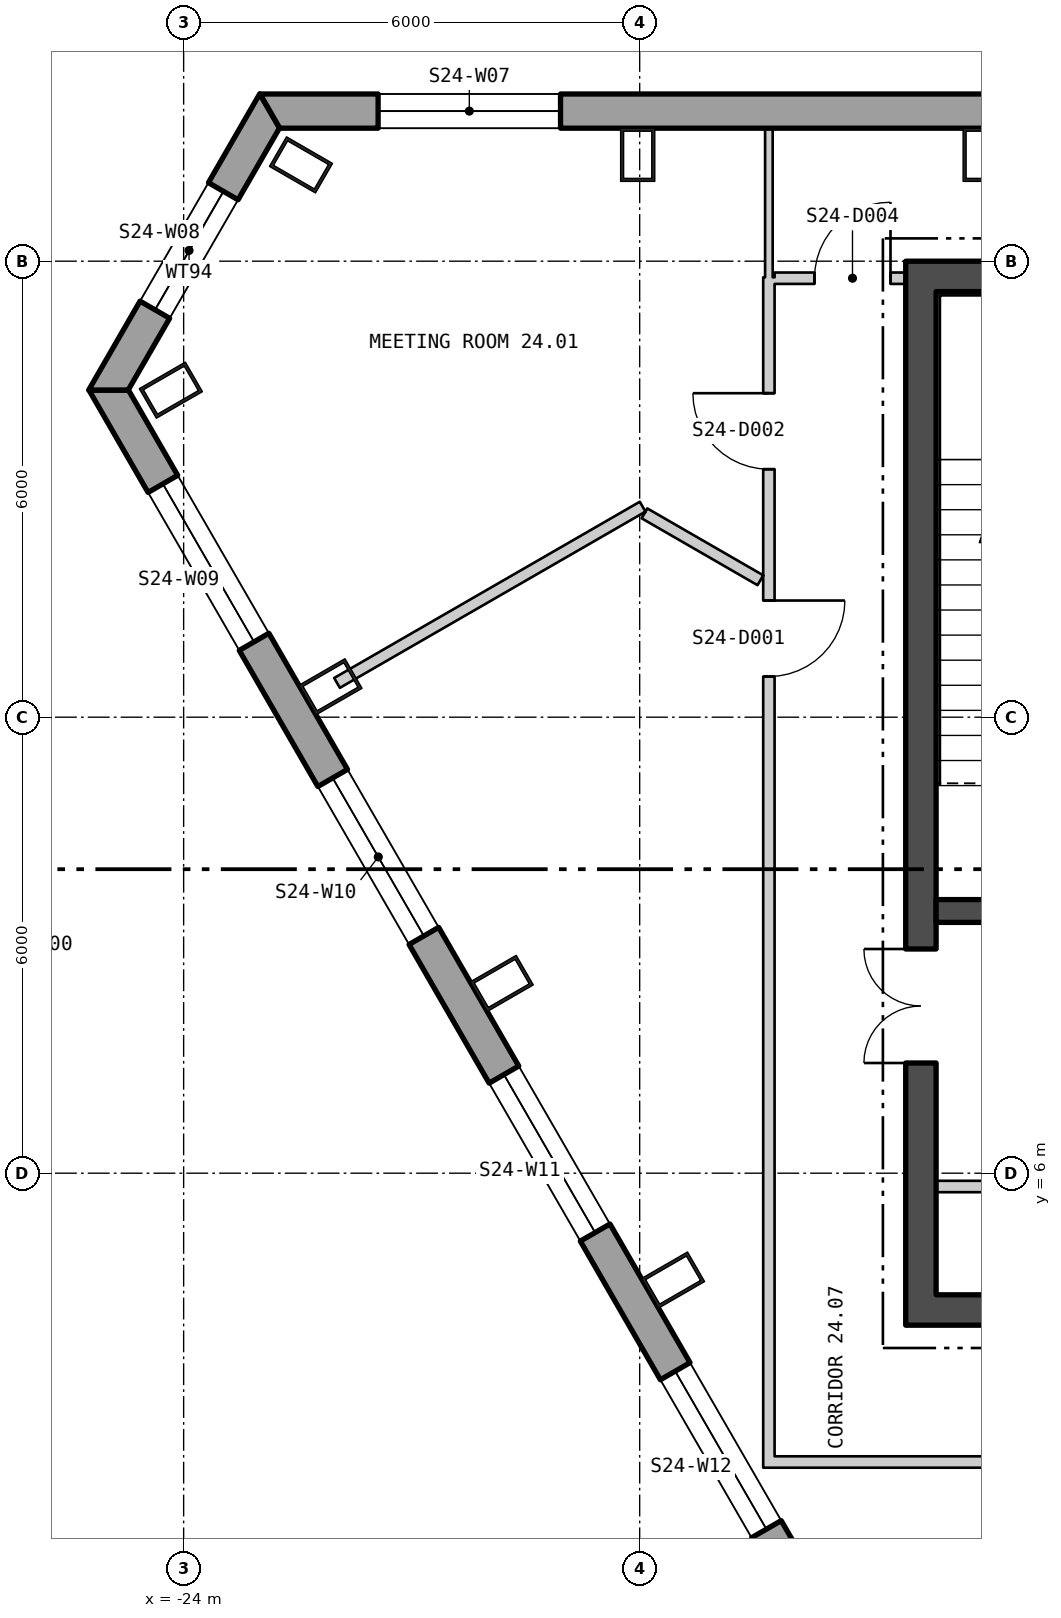
"""IFC4 building model, lengths in metres.
Left out: names, types, materials, properties, quantities, classifications, styles, units other than length and angle.
Written with IfcOpenShell. Run it as: python <this file> out.ifc"""

import sys

from ifc_helpers import new_model, si_unit, direction, frame, frame_2d, origin, origin_2d, place, context, subcontext, project, spatial, polyline, rectangle, hollow_rectangle, outline, extrude, element, fill, save


model = new_model("IFC4")
c1 = context("Model", 3, precision=1e-05, world=origin(), true_north=direction((0.0, 1.0)))
c2 = subcontext(c1, "Body", "Model", "MODEL_VIEW")
j1 = project(units=[si_unit("LENGTHUNIT", "METRE"), si_unit("PLANEANGLEUNIT", "RADIAN")], contexts=[c1])
p1 = place(None, origin())
s1 = spatial("IfcSite", under=j1, at=p1, CompositionType="ELEMENT")
p2 = place(p1, origin())
s2 = spatial("IfcBuilding", under=s1, at=p2, CompositionType="ELEMENT")
p3 = place(p2, frame((0.0, 0.0, 312.6)))
s3 = spatial("IfcBuildingStorey", under=s2, at=p3, CompositionType="ELEMENT", Elevation=312.6)
for number, where, z_axis, x_axis in (
    (1, (-13.52, 19.4, 0.0), (0.0, 0.0, 1.0), (-1.0, 0.0, 0.0)),
    (2, (-18.026, 19.4, 0.0), (0.0, 0.0, 1.0), (-1.0, 0.0, 0.0)),
    (3, (-22.456, 19.267, 0.0), (0.0, 0.0, 1.0), (-0.5, -0.866, 0.0)),
    (4, (-24.168, 16.303, 0.0), (0.0, 0.0, 1.0), (0.5, -0.866, 0.0)),
    (5, (-22.068, 12.4, 0.0), (0.0, 0.0, 1.0), (0.5, -0.866, 0.0)),
    (6, (-19.815, 8.497, 0.0), (0.0, 0.0, 1.0), (0.5, -0.866, 0.0)),
    (7, (-17.561, 4.594, 0.0), (0.0, 0.0, 1.0), (0.5, -0.866, 0.0)),
):
    element("IfcColumn", number, at=place(p3, frame(where, z_axis=z_axis, x_axis=x_axis)), inside=s3, PredefinedType="COLUMN", context=c2, shape_type="SweptSolid", body=[
        extrude(hollow_rectangle(XDim=0.45, YDim=0.7, WallThickness=0.04, at=origin_2d()), origin(), (0.0, 0.0, 1.0), 4.2),
    ])
p4 = place(p3, frame((22.865, 19.975, -0.4), z_axis=(0.0, 0.0, 1.0), x_axis=(-1.0, 0.0, 0.0)))
e8 = element("IfcWall", 8, at=p4, inside=s3, PredefinedType="SOLIDWALL", context=c2, shape_type="SweptSolid", body=[
    extrude(outline(polyline([(-0.13, -0.225), (45.86, -0.225), (45.6, 0.225), (0.13, 0.225), (-0.13, -0.225)])), origin(), (0.0, 0.0, 1.0), 4.2),
])
p5 = place(p4, frame((1.424, 0.0, 1.3)))
e9 = element("IfcOpeningElement", 9, at=p5, cuts=e8, PredefinedType="OPENING", context=c2, shape_type="SweptSolid", body=[
    extrude(rectangle(XDim=2.4, YDim=2.3, at=frame_2d((1.2, 1.15))), frame((0.0, 0.235, 0.0), z_axis=(0.0, -1.0, 0.0), x_axis=(1.0, 0.0, 0.0)), (0.0, 0.0, 1.0), 0.47),
])
p6 = place(p4, frame((14.905, 0.0, 1.3)))
e10 = element("IfcOpeningElement", 10, at=p6, cuts=e8, PredefinedType="OPENING", context=c2, shape_type="SweptSolid", body=[
    extrude(rectangle(XDim=2.4, YDim=2.3, at=frame_2d((1.2, 1.15))), frame((0.0, 0.235, 0.0), z_axis=(0.0, -1.0, 0.0), x_axis=(1.0, 0.0, 0.0)), (0.0, 0.0, 1.0), 0.47),
])
p7 = place(p4, frame((19.412, 0.0, 1.3)))
e11 = element("IfcOpeningElement", 11, at=p7, cuts=e8, PredefinedType="OPENING", context=c2, shape_type="SweptSolid", body=[
    extrude(rectangle(XDim=2.4, YDim=2.3, at=frame_2d((1.2, 1.15))), frame((0.0, 0.235, 0.0), z_axis=(0.0, -1.0, 0.0), x_axis=(1.0, 0.0, 0.0)), (0.0, 0.0, 1.0), 0.47),
])
p8 = place(p4, frame((23.918, 0.0, 1.3)))
e12 = element("IfcOpeningElement", 12, at=p8, cuts=e8, PredefinedType="OPENING", context=c2, shape_type="SweptSolid", body=[
    extrude(rectangle(XDim=2.4, YDim=2.3, at=frame_2d((1.2, 1.15))), frame((0.0, 0.235, 0.0), z_axis=(0.0, -1.0, 0.0), x_axis=(1.0, 0.0, 0.0)), (0.0, 0.0, 1.0), 0.47),
])
p9 = place(p4, frame((28.425, 0.0, 1.3)))
e13 = element("IfcOpeningElement", 13, at=p9, cuts=e8, PredefinedType="OPENING", context=c2, shape_type="SweptSolid", body=[
    extrude(rectangle(XDim=2.4, YDim=2.3, at=frame_2d((1.2, 1.15))), frame((0.0, 0.235, 0.0), z_axis=(0.0, -1.0, 0.0), x_axis=(1.0, 0.0, 0.0)), (0.0, 0.0, 1.0), 0.47),
])
p10 = place(p4, frame((32.932, 0.0, 1.3)))
e14 = element("IfcOpeningElement", 14, at=p10, cuts=e8, PredefinedType="OPENING", context=c2, shape_type="SweptSolid", body=[
    extrude(rectangle(XDim=2.4, YDim=2.3, at=frame_2d((1.2, 1.15))), frame((0.0, 0.235, 0.0), z_axis=(0.0, -1.0, 0.0), x_axis=(1.0, 0.0, 0.0)), (0.0, 0.0, 1.0), 0.47),
])
p11 = place(p4, frame((41.907, 0.0, 1.3)))
e15 = element("IfcOpeningElement", 15, at=p11, cuts=e8, PredefinedType="OPENING", context=c2, shape_type="SweptSolid", body=[
    extrude(rectangle(XDim=2.4, YDim=2.3, at=frame_2d((1.2, 1.15))), frame((0.0, 0.235, 0.0), z_axis=(0.0, -1.0, 0.0), x_axis=(1.0, 0.0, 0.0)), (0.0, 0.0, 1.0), 0.47),
])
p12 = place(p3, frame((-22.869, 19.977, -0.4), z_axis=(0.0, 0.0, 1.0), x_axis=(-0.500002136082, -0.866024170514, 0.0)))
e16 = element("IfcWall", 16, at=p12, inside=s3, PredefinedType="SOLIDWALL", context=c2, shape_type="SweptSolid", body=[
    extrude(outline(polyline([(-0.13, -0.225), (4.37, -0.225), (4.11, 0.225), (0.13, 0.225), (-0.13, -0.225)])), origin(), (0.0, 0.0, 1.0), 4.2),
])
p13 = place(p12, frame((1.22, 0.0, 1.3)))
e17 = element("IfcOpeningElement", 17, at=p13, cuts=e16, PredefinedType="OPENING", context=c2, shape_type="SweptSolid", body=[
    extrude(rectangle(XDim=1.8, YDim=2.3, at=frame_2d((0.9, 1.15))), frame((0.0, 0.235, 0.0), z_axis=(0.0, -1.0, 0.0), x_axis=(1.0, 0.0, 0.0)), (0.0, 0.0, 1.0), 0.47),
])
p14 = place(p3, frame((-24.985, 16.303, -0.18), z_axis=(0.0, 0.0, 1.0), x_axis=(0.500000141277, -0.866025322218, 0.0)))
e18 = element("IfcWall", 18, at=p14, inside=s3, PredefinedType="SOLIDWALL", context=c2, shape_type="SweptSolid", body=[
    extrude(outline(polyline([(-0.13, -0.225), (45.86, -0.225), (45.6, 0.225), (0.13, 0.225), (-0.13, -0.225)])), origin(), (0.0, 0.0, 1.0), 3.98),
])
p15 = place(p14, frame((1.424, 0.0, 1.08)))
e19 = element("IfcOpeningElement", 19, at=p15, cuts=e18, PredefinedType="OPENING", context=c2, shape_type="SweptSolid", body=[
    extrude(rectangle(XDim=2.4, YDim=2.3, at=frame_2d((1.2, 1.15))), frame((0.0, 0.235, 0.0), z_axis=(0.0, -1.0, 0.0), x_axis=(1.0, 0.0, 0.0)), (0.0, 0.0, 1.0), 0.47),
])
p16 = place(p14, frame((5.892, 0.0, 1.08)))
e20 = element("IfcOpeningElement", 20, at=p16, cuts=e18, PredefinedType="OPENING", context=c2, shape_type="SweptSolid", body=[
    extrude(rectangle(XDim=2.4, YDim=2.3, at=frame_2d((1.2, 1.15))), frame((0.0, 0.235, 0.0), z_axis=(0.0, -1.0, 0.0), x_axis=(1.0, 0.0, 0.0)), (0.0, 0.0, 1.0), 0.47),
])
p17 = place(p14, frame((10.399, 0.0, 1.08)))
e21 = element("IfcOpeningElement", 21, at=p17, cuts=e18, PredefinedType="OPENING", context=c2, shape_type="SweptSolid", body=[
    extrude(rectangle(XDim=2.4, YDim=2.3, at=frame_2d((1.2, 1.15))), frame((0.0, 0.235, 0.0), z_axis=(0.0, -1.0, 0.0), x_axis=(1.0, 0.0, 0.0)), (0.0, 0.0, 1.0), 0.47),
])
p18 = place(p14, frame((14.905, 0.0, 1.08)))
e22 = element("IfcOpeningElement", 22, at=p18, cuts=e18, PredefinedType="OPENING", context=c2, shape_type="SweptSolid", body=[
    extrude(rectangle(XDim=2.4, YDim=2.3, at=frame_2d((1.2, 1.15))), frame((0.0, 0.235, 0.0), z_axis=(0.0, -1.0, 0.0), x_axis=(1.0, 0.0, 0.0)), (0.0, 0.0, 1.0), 0.47),
])
p19 = place(p14, frame((19.412, 0.0, 1.08)))
e23 = element("IfcOpeningElement", 23, at=p19, cuts=e18, PredefinedType="OPENING", context=c2, shape_type="SweptSolid", body=[
    extrude(rectangle(XDim=2.4, YDim=2.3, at=frame_2d((1.2, 1.15))), frame((0.0, 0.235, 0.0), z_axis=(0.0, -1.0, 0.0), x_axis=(1.0, 0.0, 0.0)), (0.0, 0.0, 1.0), 0.47),
])
p20 = place(p14, frame((23.918, 0.0, 1.08)))
e24 = element("IfcOpeningElement", 24, at=p20, cuts=e18, PredefinedType="OPENING", context=c2, shape_type="SweptSolid", body=[
    extrude(rectangle(XDim=2.4, YDim=2.3, at=frame_2d((1.2, 1.15))), frame((0.0, 0.235, 0.0), z_axis=(0.0, -1.0, 0.0), x_axis=(1.0, 0.0, 0.0)), (0.0, 0.0, 1.0), 0.47),
])
p21 = place(p14, frame((28.425, 0.0, 1.08)))
e25 = element("IfcOpeningElement", 25, at=p21, cuts=e18, PredefinedType="OPENING", context=c2, shape_type="SweptSolid", body=[
    extrude(rectangle(XDim=2.4, YDim=2.3, at=frame_2d((1.2, 1.15))), frame((0.0, 0.235, 0.0), z_axis=(0.0, -1.0, 0.0), x_axis=(1.0, 0.0, 0.0)), (0.0, 0.0, 1.0), 0.47),
])
p22 = place(p14, frame((37.438, 0.0, 1.08)))
e26 = element("IfcOpeningElement", 26, at=p22, cuts=e18, PredefinedType="OPENING", context=c2, shape_type="SweptSolid", body=[
    extrude(rectangle(XDim=2.4, YDim=2.3, at=frame_2d((1.2, 1.15))), frame((0.0, 0.235, 0.0), z_axis=(0.0, -1.0, 0.0), x_axis=(1.0, 0.0, 0.0)), (0.0, 0.0, 1.0), 0.47),
])
p23 = place(p14, frame((41.907, 0.0, 1.08)))
e27 = element("IfcOpeningElement", 27, at=p23, cuts=e18, PredefinedType="OPENING", context=c2, shape_type="SweptSolid", body=[
    extrude(rectangle(XDim=2.4, YDim=2.3, at=frame_2d((1.2, 1.15))), frame((0.0, 0.235, 0.0), z_axis=(0.0, -1.0, 0.0), x_axis=(1.0, 0.0, 0.0)), (0.0, 0.0, 1.0), 0.47),
])
p24 = place(p3, frame((-14.5, 4.2, 0.0), z_axis=(0.0, 0.0, 1.0), x_axis=(1.0, 0.0, 0.0)))
e28 = element("IfcWall", 28, at=p24, inside=s3, PredefinedType="SHEAR", context=c2, shape_type="SweptSolid", body=[
    extrude(rectangle(XDim=29.0, YDim=0.4, at=frame_2d((14.5, 0.0))), origin(), (0.0, 0.0, 1.0), 4.0),
])
p25 = place(p24, frame((9.0, 0.0, 0.0)))
e29 = element("IfcOpeningElement", 29, at=p25, cuts=e28, PredefinedType="OPENING", context=c2, shape_type="SweptSolid", body=[
    extrude(rectangle(XDim=1.8, YDim=2.4, at=frame_2d((0.9, 1.2))), frame((0.0, 0.21, 0.0), z_axis=(0.0, -1.0, 0.0), x_axis=(1.0, 0.0, 0.0)), (0.0, 0.0, 1.0), 0.42),
])
p26 = place(p24, frame((19.0, 0.0, 0.0)))
e30 = element("IfcOpeningElement", 30, at=p26, cuts=e28, PredefinedType="OPENING", context=c2, shape_type="SweptSolid", body=[
    extrude(rectangle(XDim=1.8, YDim=2.4, at=frame_2d((0.9, 1.2))), frame((0.0, 0.21, 0.0), z_axis=(0.0, -1.0, 0.0), x_axis=(1.0, 0.0, 0.0)), (0.0, 0.0, 1.0), 0.42),
])
p27 = place(p3, frame((-14.5, 17.8, 0.0), z_axis=(0.0, 0.0, 1.0), x_axis=(1.0, 0.0, 0.0)))
e31 = element("IfcWall", 31, at=p27, inside=s3, PredefinedType="SHEAR", context=c2, shape_type="SweptSolid", body=[
    extrude(rectangle(XDim=29.0, YDim=0.4, at=frame_2d((14.5, 0.0))), origin(), (0.0, 0.0, 1.0), 4.0),
])
p28 = place(p3, frame((-14.3, 4.4, 0.0), z_axis=(0.0, 0.0, 1.0), x_axis=(0.0, 1.0, 0.0)))
e32 = element("IfcWall", 32, at=p28, inside=s3, PredefinedType="SHEAR", context=c2, shape_type="SweptSolid", body=[
    extrude(rectangle(XDim=13.2, YDim=0.4, at=frame_2d((6.6, 0.0))), origin(), (0.0, 0.0, 1.0), 4.0),
])
p29 = place(p28, frame((3.05, 0.0, 0.0)))
e33 = element("IfcOpeningElement", 33, at=p29, cuts=e32, PredefinedType="OPENING", context=c2, shape_type="SweptSolid", body=[
    extrude(rectangle(XDim=1.5, YDim=2.1, at=frame_2d((0.75, 1.05))), frame((0.0, 0.21, 0.0), z_axis=(0.0, -1.0, 0.0), x_axis=(1.0, 0.0, 0.0)), (0.0, 0.0, 1.0), 0.42),
])
p30 = place(p3, frame((-14.1, 9.45, 0.0), z_axis=(0.0, 0.0, 1.0), x_axis=(1.0, 0.0, 0.0)))
e34 = element("IfcWall", 34, at=p30, inside=s3, PredefinedType="SHEAR", context=c2, shape_type="SweptSolid", body=[
    extrude(rectangle(XDim=3.1, YDim=0.3, at=frame_2d((1.55, 0.0))), origin(), (0.0, 0.0, 1.0), 4.0),
])
p31 = place(p30, frame((0.95, 0.0, 0.0)))
e35 = element("IfcOpeningElement", 35, at=p31, cuts=e34, PredefinedType="OPENING", context=c2, shape_type="SweptSolid", body=[
    extrude(rectangle(XDim=1.2, YDim=2.1, at=frame_2d((0.6, 1.05))), frame((0.0, 0.16, 0.0), z_axis=(0.0, -1.0, 0.0), x_axis=(1.0, 0.0, 0.0)), (0.0, 0.0, 1.0), 0.32),
])
p32 = place(p3, frame((-14.1, 5.825, 0.0), z_axis=(0.0, 0.0, 1.0), x_axis=(1.0, 0.0, 0.0)))
e36 = element("IfcWall", 36, at=p32, inside=s3, PredefinedType="PARTITIONING", context=c2, shape_type="SweptSolid", body=[
    extrude(rectangle(XDim=3.1, YDim=0.15, at=frame_2d((1.55, 0.0))), origin(), (0.0, 0.0, 1.0), 4.0),
])
p33 = place(p3, frame((-21.982, 12.451, 0.0), z_axis=(0.0, 0.0, 1.0), x_axis=(0.866260894491, 0.499591896127, 0.0)))
e37 = element("IfcWall", 37, at=p33, inside=s3, PredefinedType="PARTITIONING", context=c2, shape_type="SweptSolid", body=[
    extrude(rectangle(XDim=4.642, YDim=0.15, at=frame_2d((2.321, 0.0))), origin(), (0.0, 0.0, 1.0), 4.0),
])
p34 = place(p3, frame((-17.937, 14.682, 0.0), z_axis=(0.0, 0.0, 1.0), x_axis=(0.866138304741, -0.499804398801, 0.0)))
e38 = element("IfcWall", 38, at=p34, inside=s3, PredefinedType="PARTITIONING", context=c2, shape_type="SweptSolid", body=[
    extrude(rectangle(XDim=1.761, YDim=0.15, at=frame_2d((0.88, 0.0))), origin(), (0.0, 0.0, 1.0), 4.0),
])
p35 = place(p3, frame((-16.3, 2.125, 0.0), z_axis=(0.0, 0.0, 1.0), x_axis=(0.0, 1.0, 0.0)))
e39 = element("IfcWall", 39, at=p35, inside=s3, PredefinedType="PARTITIONING", context=c2, shape_type="SweptSolid", body=[
    extrude(rectangle(XDim=15.663, YDim=0.15, at=frame_2d((7.832, 0.0))), origin(), (0.0, 0.0, 1.0), 4.0),
])
p36 = place(p35, frame((10.41, 0.0, 0.0)))
e40 = element("IfcOpeningElement", 40, at=p36, cuts=e39, PredefinedType="OPENING", context=c2, shape_type="SweptSolid", body=[
    extrude(rectangle(XDim=1.0, YDim=2.1, at=frame_2d((0.5, 1.05))), frame((0.0, 0.085, 0.0), z_axis=(0.0, -1.0, 0.0), x_axis=(1.0, 0.0, 0.0)), (0.0, 0.0, 1.0), 0.17),
])
p37 = place(p35, frame((13.138, 0.0, 0.0)))
e41 = element("IfcOpeningElement", 41, at=p37, cuts=e39, PredefinedType="OPENING", context=c2, shape_type="SweptSolid", body=[
    extrude(rectangle(XDim=1.0, YDim=2.1, at=frame_2d((0.5, 1.05))), frame((0.0, 0.085, 0.0), z_axis=(0.0, -1.0, 0.0), x_axis=(1.0, 0.0, 0.0)), (0.0, 0.0, 1.0), 0.17),
])
p38 = place(p3, frame((-16.3, 17.788, 0.0), z_axis=(0.0, 0.0, 1.0), x_axis=(0.0, 1.0, 0.0)))
e42 = element("IfcWall", 42, at=p38, inside=s3, PredefinedType="PARTITIONING", context=c2, shape_type="SweptSolid", body=[
    extrude(rectangle(XDim=1.96, YDim=0.1, at=frame_2d((0.98, 0.0))), origin(), (0.0, 0.0, 1.0), 4.0),
])
p39 = place(p3, frame((-16.225, 2.2, 0.0), z_axis=(0.0, 0.0, 1.0), x_axis=(1.0, 0.0, 0.0)))
e43 = element("IfcWall", 43, at=p39, inside=s3, PredefinedType="PARTITIONING", context=c2, shape_type="SweptSolid", body=[
    extrude(rectangle(XDim=8.703, YDim=0.15, at=frame_2d((4.351, 0.0))), origin(), (0.0, 0.0, 1.0), 4.0),
])
p40 = place(p39, frame((4.232, 0.0, 0.0)))
e44 = element("IfcOpeningElement", 44, at=p40, cuts=e43, PredefinedType="OPENING", context=c2, shape_type="SweptSolid", body=[
    extrude(rectangle(XDim=1.8, YDim=2.1, at=frame_2d((0.9, 1.05))), frame((0.0, 0.085, 0.0), z_axis=(0.0, -1.0, 0.0), x_axis=(1.0, 0.0, 0.0)), (0.0, 0.0, 1.0), 0.17),
])
p41 = place(p3, frame((-16.225, 17.776, 0.0), z_axis=(0.0, 0.0, 1.0), x_axis=(1.0, 0.0, 0.0)))
e45 = element("IfcWall", 45, at=p41, inside=s3, PredefinedType="PARTITIONING", context=c2, shape_type="SweptSolid", body=[
    extrude(rectangle(XDim=1.725, YDim=0.15, at=frame_2d((0.863, 0.0))), origin(), (0.0, 0.0, 1.0), 4.0),
])
p42 = place(p41, frame((0.525, 0.0, 0.0)))
e46 = element("IfcOpeningElement", 46, at=p42, cuts=e45, PredefinedType="OPENING", context=c2, shape_type="SweptSolid", body=[
    extrude(rectangle(XDim=1.0, YDim=2.1, at=frame_2d((0.5, 1.05))), frame((0.0, 0.085, 0.0), z_axis=(0.0, -1.0, 0.0), x_axis=(1.0, 0.0, 0.0)), (0.0, 0.0, 1.0), 0.17),
])
p43 = place(p11, origin())
e47 = element("IfcWindow", 47, at=p43, inside=s3, PartitioningType="SINGLE_PANEL", PredefinedType="WINDOW", context=c2, shape_type="SweptSolid", body=[
    extrude(rectangle(XDim=2.4, YDim=2.3, at=frame_2d((1.2, 1.15))), frame((0.0, 0.105, 0.0), z_axis=(0.0, -1.0, 0.0), x_axis=(1.0, 0.0, 0.0)), (0.0, 0.0, 1.0), 0.06),
])
fill(e15, e47)
p44 = place(p13, origin())
e48 = element("IfcWindow", 48, at=p44, inside=s3, PartitioningType="SINGLE_PANEL", PredefinedType="WINDOW", context=c2, shape_type="SweptSolid", body=[
    extrude(rectangle(XDim=1.8, YDim=2.3, at=frame_2d((0.9, 1.15))), frame((0.0, 0.105, 0.0), z_axis=(0.0, -1.0, 0.0), x_axis=(1.0, 0.0, 0.0)), (0.0, 0.0, 1.0), 0.06),
])
fill(e17, e48)
p45 = place(p15, origin())
e49 = element("IfcWindow", 49, at=p45, inside=s3, PartitioningType="SINGLE_PANEL", PredefinedType="WINDOW", context=c2, shape_type="SweptSolid", body=[
    extrude(rectangle(XDim=2.4, YDim=2.3, at=frame_2d((1.2, 1.15))), frame((0.0, 0.105, 0.0), z_axis=(0.0, -1.0, 0.0), x_axis=(1.0, 0.0, 0.0)), (0.0, 0.0, 1.0), 0.06),
])
fill(e19, e49)
p46 = place(p16, origin())
e50 = element("IfcWindow", 50, at=p46, inside=s3, PartitioningType="SINGLE_PANEL", PredefinedType="WINDOW", context=c2, shape_type="SweptSolid", body=[
    extrude(rectangle(XDim=2.4, YDim=2.3, at=frame_2d((1.2, 1.15))), frame((0.0, 0.105, 0.0), z_axis=(0.0, -1.0, 0.0), x_axis=(1.0, 0.0, 0.0)), (0.0, 0.0, 1.0), 0.06),
])
fill(e20, e50)
p47 = place(p17, origin())
e51 = element("IfcWindow", 51, at=p47, inside=s3, PartitioningType="SINGLE_PANEL", PredefinedType="WINDOW", context=c2, shape_type="SweptSolid", body=[
    extrude(rectangle(XDim=2.4, YDim=2.3, at=frame_2d((1.2, 1.15))), frame((0.0, 0.105, 0.0), z_axis=(0.0, -1.0, 0.0), x_axis=(1.0, 0.0, 0.0)), (0.0, 0.0, 1.0), 0.06),
])
fill(e21, e51)
p48 = place(p18, origin())
e52 = element("IfcWindow", 52, at=p48, inside=s3, PartitioningType="SINGLE_PANEL", PredefinedType="WINDOW", context=c2, shape_type="SweptSolid", body=[
    extrude(rectangle(XDim=2.4, YDim=2.3, at=frame_2d((1.2, 1.15))), frame((0.0, 0.105, 0.0), z_axis=(0.0, -1.0, 0.0), x_axis=(1.0, 0.0, 0.0)), (0.0, 0.0, 1.0), 0.06),
])
fill(e22, e52)
p49 = place(p29, origin())
e53 = element("IfcDoor", 53, at=p49, inside=s3, OperationType="DOUBLE_DOOR_SINGLE_SWING", PredefinedType="DOOR", context=c2, shape_type="SweptSolid", body=[
    extrude(rectangle(XDim=1.5, YDim=2.1, at=frame_2d((0.75, 1.05))), frame((0.0, 0.025, 0.0), z_axis=(0.0, -1.0, 0.0), x_axis=(1.0, 0.0, 0.0)), (0.0, 0.0, 1.0), 0.05),
])
fill(e33, e53)
p50 = place(p36, origin())
e54 = element("IfcDoor", 54, at=p50, inside=s3, OperationType="SINGLE_SWING_RIGHT", PredefinedType="DOOR", context=c2, shape_type="SweptSolid", body=[
    extrude(rectangle(XDim=1.0, YDim=2.1, at=frame_2d((0.5, 1.05))), frame((0.0, 0.025, 0.0), z_axis=(0.0, -1.0, 0.0), x_axis=(1.0, 0.0, 0.0)), (0.0, 0.0, 1.0), 0.05),
])
fill(e40, e54)
p51 = place(p37, origin())
e55 = element("IfcDoor", 55, at=p51, inside=s3, OperationType="SINGLE_SWING_LEFT", PredefinedType="DOOR", context=c2, shape_type="SweptSolid", body=[
    extrude(rectangle(XDim=1.0, YDim=2.1, at=frame_2d((0.5, 1.05))), frame((0.0, 0.025, 0.0), z_axis=(0.0, -1.0, 0.0), x_axis=(1.0, 0.0, 0.0)), (0.0, 0.0, 1.0), 0.05),
])
fill(e41, e55)
p52 = place(p42, origin())
e56 = element("IfcDoor", 56, at=p52, inside=s3, OperationType="SINGLE_SWING_LEFT", PredefinedType="DOOR", context=c2, shape_type="SweptSolid", body=[
    extrude(rectangle(XDim=1.0, YDim=2.1, at=frame_2d((0.5, 1.05))), frame((0.0, 0.025, 0.0), z_axis=(0.0, -1.0, 0.0), x_axis=(1.0, 0.0, 0.0)), (0.0, 0.0, 1.0), 0.05),
])
fill(e46, e56)
save(model, sys.argv[1])
